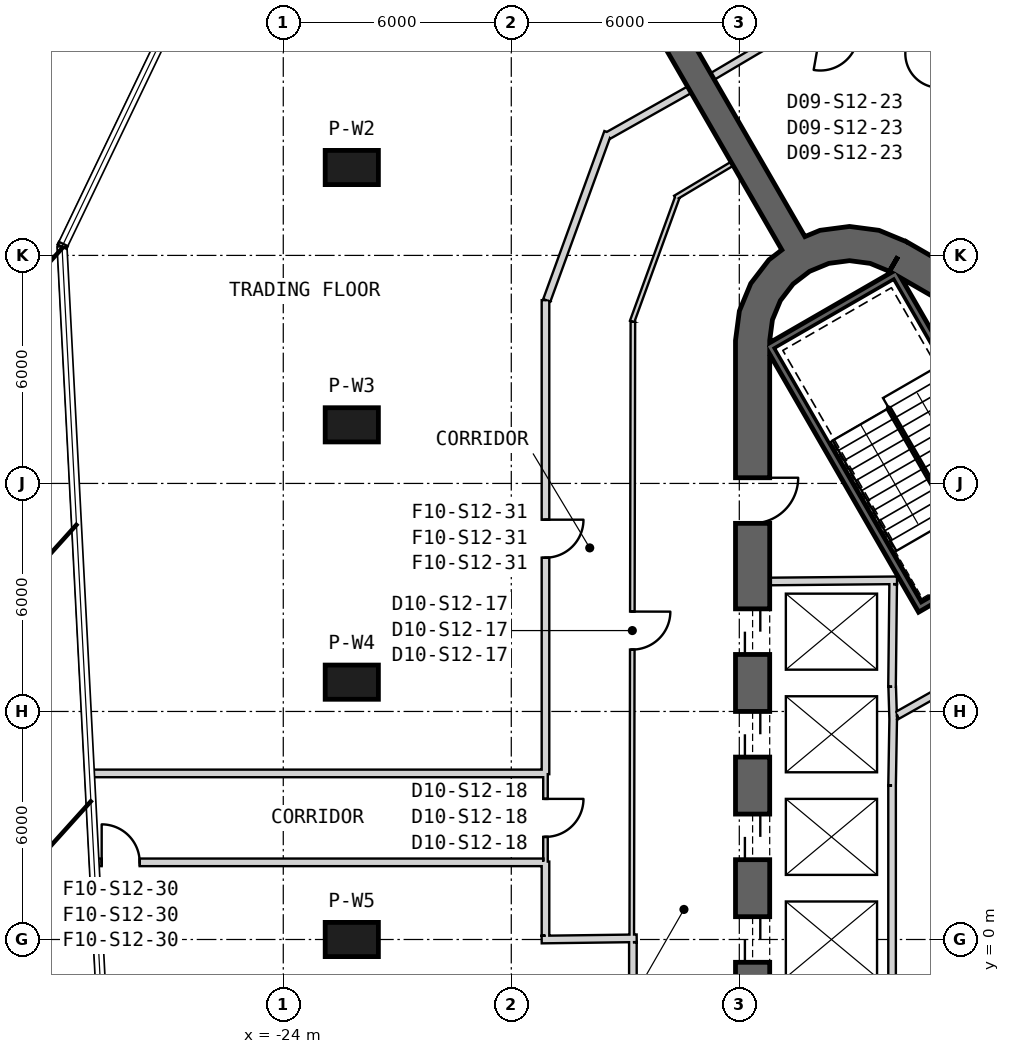
"""IFC4 building model, lengths in metres.
Left out: names, types, materials, properties, quantities, classifications, styles, units other than length and angle.
Written with IfcOpenShell. Run it as: python <this file> out.ifc"""

import sys

from ifc_helpers import new_model, si_unit, direction, frame, frame_2d, origin, origin_2d, place, context, subcontext, project, spatial, polyline, rectangle, outline, extrude, element, fill, save


model = new_model("IFC4")
c1 = context("Model", 3, precision=1e-05, world=origin(), true_north=direction((0.0, 1.0)))
c2 = subcontext(c1, "Body", "Model", "MODEL_VIEW")
j1 = project(units=[si_unit("LENGTHUNIT", "METRE"), si_unit("PLANEANGLEUNIT", "RADIAN")], contexts=[c1])
p1 = place(None, origin())
s1 = spatial("IfcSite", under=j1, at=p1, CompositionType="ELEMENT")
p2 = place(p1, origin())
s2 = spatial("IfcBuilding", under=s1, at=p2, CompositionType="ELEMENT")
p3 = place(p2, frame((0.0, 0.0, 205.2)))
s3 = spatial("IfcBuildingStorey", under=s2, at=p3, CompositionType="ELEMENT", Elevation=205.2)
for number, where, z_axis, x_axis in (
    (1, (-22.197, 20.313, 0.0), (0.0, 0.0, 1.0), (-1.0, 0.0, 0.0)),
    (2, (-22.197, 13.542, 0.0), (0.0, 0.0, 1.0), (-1.0, 0.0, 0.0)),
    (3, (-22.197, 6.771, 0.0), (0.0, 0.0, 1.0), (-1.0, 0.0, 0.0)),
    (4, (-22.197, 0.0, 0.0), (0.0, 0.0, 1.0), (-1.0, 0.0, 0.0)),
):
    element("IfcColumn", number, at=place(p3, frame(where, z_axis=z_axis, x_axis=x_axis)), inside=s3, PredefinedType="COLUMN", context=c2, shape_type="SweptSolid", body=[
        extrude(rectangle(XDim=1.4, YDim=0.9, at=origin_2d()), origin(), (0.0, 0.0, 1.0), 4.0),
    ])
p4 = place(p3, frame((19.475, 2.208, 0.0), z_axis=(0.0, 0.0, 1.0), x_axis=(-0.866028369851, 0.499994862586, 0.0)))
e5 = element("IfcWall", 5, at=p4, inside=s3, PredefinedType="SHEAR", context=c2, shape_type="SweptSolid", body=[
    extrude(rectangle(XDim=31.523, YDim=0.9, at=frame_2d((15.762, 0.0))), origin(), (0.0, 0.0, 1.0), 4.0),
])
p5 = place(p4, frame((7.062, 0.0, 0.0)))
e6 = element("IfcOpeningElement", 6, at=p5, cuts=e5, PredefinedType="OPENING", context=c2, shape_type="SweptSolid", body=[
    extrude(rectangle(XDim=1.2, YDim=2.4, at=frame_2d((0.6, 1.2))), frame((0.0, 0.46, 0.0), z_axis=(0.0, -1.0, 0.0), x_axis=(1.0, 0.0, 0.0)), (0.0, 0.0, 1.0), 0.92),
])
p6 = place(p4, frame((3.612, 0.0, 0.0)))
e7 = element("IfcOpeningElement", 7, at=p6, cuts=e5, PredefinedType="OPENING", context=c2, shape_type="SweptSolid", body=[
    extrude(rectangle(XDim=1.2, YDim=2.4, at=frame_2d((0.6, 1.2))), frame((0.0, 0.46, 0.0), z_axis=(0.0, -1.0, 0.0), x_axis=(1.0, 0.0, 0.0)), (0.0, 0.0, 1.0), 0.92),
])
p7 = place(p4, frame((26.712, 0.0, 0.0)))
e8 = element("IfcOpeningElement", 8, at=p7, cuts=e5, PredefinedType="OPENING", context=c2, shape_type="SweptSolid", body=[
    extrude(rectangle(XDim=1.2, YDim=2.4, at=frame_2d((0.6, 1.2))), frame((0.0, 0.46, 0.0), z_axis=(0.0, -1.0, 0.0), x_axis=(1.0, 0.0, 0.0)), (0.0, 0.0, 1.0), 0.92),
])
p8 = place(p3, frame((-11.65, 15.762, 0.0), z_axis=(0.0, 0.0, 1.0), x_axis=(0.0, -1.0, 0.0)))
e9 = element("IfcWall", 9, at=p8, inside=s3, PredefinedType="SHEAR", context=c2, shape_type="SweptSolid", body=[
    extrude(rectangle(XDim=31.523, YDim=0.9, at=frame_2d((15.762, 0.0))), origin(), (0.0, 0.0, 1.0), 4.0),
])
p9 = place(p8, frame((7.062, 0.0, 0.0)))
e10 = element("IfcOpeningElement", 10, at=p9, cuts=e9, PredefinedType="OPENING", context=c2, shape_type="SweptSolid", body=[
    extrude(rectangle(XDim=1.2, YDim=2.4, at=frame_2d((0.6, 1.2))), frame((0.0, 0.46, 0.0), z_axis=(0.0, -1.0, 0.0), x_axis=(1.0, 0.0, 0.0)), (0.0, 0.0, 1.0), 0.92),
])
p10 = place(p8, frame((9.762, 0.0, 0.0)))
e11 = element("IfcOpeningElement", 11, at=p10, cuts=e9, PredefinedType="OPENING", context=c2, shape_type="SweptSolid", body=[
    extrude(rectangle(XDim=1.2, YDim=2.4, at=frame_2d((0.6, 1.2))), frame((0.0, 0.46, 0.0), z_axis=(0.0, -1.0, 0.0), x_axis=(1.0, 0.0, 0.0)), (0.0, 0.0, 1.0), 0.92),
])
p11 = place(p8, frame((12.462, 0.0, 0.0)))
e12 = element("IfcOpeningElement", 12, at=p11, cuts=e9, PredefinedType="OPENING", context=c2, shape_type="SweptSolid", body=[
    extrude(rectangle(XDim=1.2, YDim=2.4, at=frame_2d((0.6, 1.2))), frame((0.0, 0.46, 0.0), z_axis=(0.0, -1.0, 0.0), x_axis=(1.0, 0.0, 0.0)), (0.0, 0.0, 1.0), 0.92),
])
p12 = place(p8, frame((15.162, 0.0, 0.0)))
e13 = element("IfcOpeningElement", 13, at=p12, cuts=e9, PredefinedType="OPENING", context=c2, shape_type="SweptSolid", body=[
    extrude(rectangle(XDim=1.2, YDim=2.4, at=frame_2d((0.6, 1.2))), frame((0.0, 0.46, 0.0), z_axis=(0.0, -1.0, 0.0), x_axis=(1.0, 0.0, 0.0)), (0.0, 0.0, 1.0), 0.92),
])
p13 = place(p8, frame((17.862, 0.0, 0.0)))
e14 = element("IfcOpeningElement", 14, at=p13, cuts=e9, PredefinedType="OPENING", context=c2, shape_type="SweptSolid", body=[
    extrude(rectangle(XDim=1.2, YDim=2.4, at=frame_2d((0.6, 1.2))), frame((0.0, 0.46, 0.0), z_axis=(0.0, -1.0, 0.0), x_axis=(1.0, 0.0, 0.0)), (0.0, 0.0, 1.0), 0.92),
])
p14 = place(p8, frame((20.562, 0.0, 0.0)))
e15 = element("IfcOpeningElement", 15, at=p14, cuts=e9, PredefinedType="OPENING", context=c2, shape_type="SweptSolid", body=[
    extrude(rectangle(XDim=1.2, YDim=2.4, at=frame_2d((0.6, 1.2))), frame((0.0, 0.46, 0.0), z_axis=(0.0, -1.0, 0.0), x_axis=(1.0, 0.0, 0.0)), (0.0, 0.0, 1.0), 0.92),
])
p15 = place(p8, frame((23.262, 0.0, 0.0)))
e16 = element("IfcOpeningElement", 16, at=p15, cuts=e9, PredefinedType="OPENING", context=c2, shape_type="SweptSolid", body=[
    extrude(rectangle(XDim=1.2, YDim=2.4, at=frame_2d((0.6, 1.2))), frame((0.0, 0.46, 0.0), z_axis=(0.0, -1.0, 0.0), x_axis=(1.0, 0.0, 0.0)), (0.0, 0.0, 1.0), 0.92),
])
p16 = place(p8, frame((3.612, 0.0, 0.0)))
e17 = element("IfcOpeningElement", 17, at=p16, cuts=e9, PredefinedType="OPENING", context=c2, shape_type="SweptSolid", body=[
    extrude(rectangle(XDim=1.2, YDim=2.4, at=frame_2d((0.6, 1.2))), frame((0.0, 0.46, 0.0), z_axis=(0.0, -1.0, 0.0), x_axis=(1.0, 0.0, 0.0)), (0.0, 0.0, 1.0), 0.92),
])
p17 = place(p8, frame((26.712, 0.0, 0.0)))
e18 = element("IfcOpeningElement", 18, at=p17, cuts=e9, PredefinedType="OPENING", context=c2, shape_type="SweptSolid", body=[
    extrude(rectangle(XDim=1.2, YDim=2.4, at=frame_2d((0.6, 1.2))), frame((0.0, 0.46, 0.0), z_axis=(0.0, -1.0, 0.0), x_axis=(1.0, 0.0, 0.0)), (0.0, 0.0, 1.0), 0.92),
])
p18 = place(p3, origin())
e19 = element("IfcWall", 19, at=p18, inside=s3, PredefinedType="SHEAR", context=c2, shape_type="SweptSolid", body=[
    extrude(outline(polyline([(-7.6, 18.36), (-8.323, 18.659), (-9.1, 18.762), (-9.876, 18.659), (-10.6, 18.36), (-11.221, 17.883), (-11.698, 17.262), (-11.998, 16.538), (-12.1, 15.762), (-11.2, 15.762), (-11.128, 16.305), (-10.919, 16.812), (-10.585, 17.247), (-10.15, 17.58), (-9.644, 17.79), (-9.1, 17.862), (-8.556, 17.79), (-8.05, 17.58), (-7.6, 18.36)])), origin(), (0.0, 0.0, 1.0), 4.0),
])
p19 = place(p3, frame((-10.575, 18.316, 0.0), z_axis=(0.0, 0.0, 1.0), x_axis=(-0.499999598486, 0.866025635599, 0.0)))
e20 = element("IfcWall", 20, at=p19, inside=s3, PredefinedType="SHEAR", context=c2, shape_type="SweptSolid", body=[
    extrude(rectangle(XDim=11.794, YDim=0.7, at=frame_2d((5.897, 0.0))), origin(), (0.0, 0.0, 1.0), 4.0),
])
p20 = place(p3, frame((-11.2, 9.42, 0.0), z_axis=(0.0, 0.0, 1.0), x_axis=(0.999957167047, 0.009255488683, 0.0)))
e21 = element("IfcWall", 21, at=p20, inside=s3, PredefinedType="PLUMBINGWALL", context=c2, shape_type="SweptSolid", body=[
    extrude(rectangle(XDim=3.35, YDim=0.2, at=frame_2d((1.675, 0.0))), origin(), (0.0, 0.0, 1.0), 3.7),
])
p21 = place(p3, frame((-7.951, 9.35, 0.0), z_axis=(0.0, 0.0, 1.0), x_axis=(-0.011120469654, -0.999938165666, 0.0)))
e22 = element("IfcWall", 22, at=p21, inside=s3, PredefinedType="PLUMBINGWALL", context=c2, shape_type="SweptSolid", body=[
    extrude(rectangle(XDim=2.7, YDim=0.2, at=frame_2d((1.35, 0.0))), origin(), (0.0, 0.0, 1.0), 3.7),
])
p22 = place(p3, frame((-7.977, 6.65, 0.0), z_axis=(0.0, 0.0, 1.0), x_axis=(0.030861509705, -0.999523670164, 0.0)))
e23 = element("IfcWall", 23, at=p22, inside=s3, PredefinedType="PLUMBINGWALL", context=c2, shape_type="SweptSolid", body=[
    extrude(rectangle(XDim=0.878, YDim=0.2, at=frame_2d((0.439, 0.0))), origin(), (0.0, 0.0, 1.0), 3.7),
])
p23 = place(p3, frame((-7.949, 5.894, 0.0), z_axis=(0.0, 0.0, 1.0), x_axis=(-0.016809909365, -0.999858703491, 0.0)))
e24 = element("IfcWall", 24, at=p23, inside=s3, PredefinedType="PLUMBINGWALL", context=c2, shape_type="SweptSolid", body=[
    extrude(rectangle(XDim=1.844, YDim=0.2, at=frame_2d((0.922, 0.0))), origin(), (0.0, 0.0, 1.0), 3.7),
])
p24 = place(p3, frame((-7.98, 4.05, 0.0), z_axis=(0.0, 0.0, 1.0), x_axis=(0.0, -1.0, 0.0)))
e25 = element("IfcWall", 25, at=p24, inside=s3, PredefinedType="PLUMBINGWALL", context=c2, shape_type="SweptSolid", body=[
    extrude(rectangle(XDim=8.1, YDim=0.2, at=frame_2d((4.05, 0.0))), origin(), (0.0, 0.0, 1.0), 3.7),
])
p25 = place(p3, frame((-11.245, 15.678, -0.3), z_axis=(0.0, 0.0, 1.0), x_axis=(0.499977274689, -0.866038523851, 0.0)))
e26 = element("IfcWall", 26, at=p25, inside=s3, PredefinedType="SHEAR", context=c2, shape_type="SweptSolid", body=[
    extrude(rectangle(XDim=8.1, YDim=0.2, at=frame_2d((4.05, 0.0))), origin(), (0.0, 0.0, 1.0), 4.0),
])
p26 = place(p3, frame((-7.818, 17.541, -0.3), z_axis=(0.0, 0.0, 1.0), x_axis=(-0.866044365799, -0.499967155389, 0.0)))
e27 = element("IfcWall", 27, at=p26, inside=s3, PredefinedType="SHEAR", context=c2, shape_type="SweptSolid", body=[
    extrude(rectangle(XDim=3.8, YDim=0.2, at=frame_2d((1.9, 0.0))), origin(), (0.0, 0.0, 1.0), 4.0),
])
p27 = place(p3, frame((-7.854, 17.405, -0.3), z_axis=(0.0, 0.0, 1.0), x_axis=(0.499997992926, -0.866026562566, 0.0)))
e28 = element("IfcWall", 28, at=p27, inside=s3, PredefinedType="SHEAR", context=c2, shape_type="SweptSolid", body=[
    extrude(rectangle(XDim=7.9, YDim=0.2, at=frame_2d((3.95, 0.0))), origin(), (0.0, 0.0, 1.0), 4.0),
])
p28 = place(p3, frame((-7.159, 8.8, -0.3), z_axis=(0.0, 0.0, 1.0), x_axis=(0.866047807691, 0.499961193289, 0.0)))
e29 = element("IfcWall", 29, at=p28, inside=s3, PredefinedType="SHEAR", context=c2, shape_type="SweptSolid", body=[
    extrude(rectangle(XDim=3.6, YDim=0.2, at=frame_2d((1.8, 0.0))), origin(), (0.0, 0.0, 1.0), 4.0),
])
p29 = place(p28, frame((1.25, 0.0, 0.3)))
e30 = element("IfcOpeningElement", 30, at=p29, cuts=e29, PredefinedType="OPENING", context=c2, shape_type="SweptSolid", body=[
    extrude(rectangle(XDim=1.1, YDim=2.1, at=frame_2d((0.55, 1.05))), frame((0.0, 0.11, 0.0), z_axis=(0.0, -1.0, 0.0), x_axis=(1.0, 0.0, 0.0)), (0.0, 0.0, 1.0), 0.22),
])
p30 = place(p3, frame((-5.6, 7.16, 0.0), z_axis=(0.0, 0.0, 1.0), x_axis=(-0.871340486379, -0.490678873396, 0.0)))
e31 = element("IfcWall", 31, at=p30, inside=s3, PredefinedType="PARTITIONING", context=c2, shape_type="SweptSolid", body=[
    extrude(rectangle(XDim=2.581, YDim=0.2, at=frame_2d((1.291, 0.0))), origin(), (0.0, 0.0, 1.0), 3.7),
])
p31 = place(p3, frame((-12.189, 20.411, 0.0), z_axis=(0.0, 0.0, 1.0), x_axis=(-0.858492721014, -0.51282574815, 0.0)))
e32 = element("IfcWall", 32, at=p31, inside=s3, PredefinedType="PARTITIONING", context=c2, shape_type="SweptSolid", body=[
    extrude(rectangle(XDim=1.742, YDim=0.12, at=frame_2d((0.871, 0.0))), origin(), (0.0, 0.0, 1.0), 3.7),
])
p32 = place(p3, frame((-13.631, 19.53, 0.0), z_axis=(0.0, 0.0, 1.0), x_axis=(-0.342069878069, -0.939674517329, 0.0)))
e33 = element("IfcWall", 33, at=p32, inside=s3, PredefinedType="PARTITIONING", context=c2, shape_type="SweptSolid", body=[
    extrude(rectangle(XDim=3.479, YDim=0.12, at=frame_2d((1.739, 0.0))), origin(), (0.0, 0.0, 1.0), 2.78),
])
p33 = place(p3, frame((-14.8, 16.257, 0.0), z_axis=(0.0, 0.0, 1.0), x_axis=(-0.001847148781, -0.999998294019, 0.0)))
e34 = element("IfcWall", 34, at=p33, inside=s3, PredefinedType="PARTITIONING", context=c2, shape_type="SweptSolid", body=[
    extrude(rectangle(XDim=16.257, YDim=0.12, at=frame_2d((8.128, 0.0))), origin(), (0.0, 0.0, 1.0), 2.88),
])
p34 = place(p33, frame((7.629, 0.0, 0.0)))
e35 = element("IfcOpeningElement", 35, at=p34, cuts=e34, PredefinedType="OPENING", context=c2, shape_type="SweptSolid", body=[
    extrude(rectangle(XDim=1.0, YDim=2.1, at=frame_2d((0.5, 1.05))), frame((0.0, 0.07, 0.0), z_axis=(0.0, -1.0, 0.0), x_axis=(1.0, 0.0, 0.0)), (0.0, 0.0, 1.0), 0.14),
])
p35 = place(p3, frame((-17.1, 4.35, 0.0), z_axis=(0.0, 0.0, 1.0), x_axis=(0.0, -1.0, 0.0)))
e36 = element("IfcWall", 36, at=p35, inside=s3, PredefinedType="PARTITIONING", context=c2, shape_type="SweptSolid", body=[
    extrude(rectangle(XDim=2.3, YDim=0.12, at=frame_2d((1.15, 0.0))), origin(), (0.0, 0.0, 1.0), 3.7),
])
p36 = place(p35, frame((0.65, 0.0, 0.0)))
e37 = element("IfcOpeningElement", 37, at=p36, cuts=e36, PredefinedType="OPENING", context=c2, shape_type="SweptSolid", body=[
    extrude(rectangle(XDim=1.0, YDim=2.1, at=frame_2d((0.5, 1.05))), frame((0.0, 0.07, 0.0), z_axis=(0.0, -1.0, 0.0), x_axis=(1.0, 0.0, 0.0)), (0.0, 0.0, 1.0), 0.14),
])
p37 = place(p3, frame((-17.2, -0.001, 0.0), z_axis=(0.0, 0.0, 1.0), x_axis=(0.999915662945, 0.012987185857, 0.0)))
e38 = element("IfcWall", 38, at=p37, inside=s3, PredefinedType="PARTITIONING", context=c2, shape_type="SweptSolid", body=[
    extrude(rectangle(XDim=2.5, YDim=0.2, at=frame_2d((1.25, 0.0))), origin(), (0.0, 0.0, 1.0), 3.07),
])
p38 = place(p3, frame((-17.1, 16.823, 0.0), z_axis=(0.0, 0.0, 1.0), x_axis=(0.0, -1.0, 0.0)))
e39 = element("IfcWall", 39, at=p38, inside=s3, PredefinedType="PARTITIONING", context=c2, shape_type="SweptSolid", body=[
    extrude(rectangle(XDim=12.473, YDim=0.2, at=frame_2d((6.236, 0.0))), origin(), (0.0, 0.0, 1.0), 2.88),
])
p39 = place(p38, frame((5.776, 0.0, 0.0)))
e40 = element("IfcOpeningElement", 40, at=p39, cuts=e39, PredefinedType="OPENING", context=c2, shape_type="SweptSolid", body=[
    extrude(rectangle(XDim=1.0, YDim=2.1, at=frame_2d((0.5, 1.05))), frame((0.0, 0.11, 0.0), z_axis=(0.0, -1.0, 0.0), x_axis=(1.0, 0.0, 0.0)), (0.0, 0.0, 1.0), 0.22),
])
p40 = place(p3, frame((-17.1, 2.05, 0.0), z_axis=(0.0, 0.0, 1.0), x_axis=(0.0, -1.0, 0.0)))
e41 = element("IfcWall", 41, at=p40, inside=s3, PredefinedType="PARTITIONING", context=c2, shape_type="SweptSolid", body=[
    extrude(rectangle(XDim=1.95, YDim=0.2, at=frame_2d((0.975, 0.0))), origin(), (0.0, 0.0, 1.0), 3.07),
])
p41 = place(p3, frame((-15.456, 21.239, 0.0), z_axis=(0.0, 0.0, 1.0), x_axis=(-0.34205546997, -0.939679762187, 0.0)))
e42 = element("IfcWall", 42, at=p41, inside=s3, PredefinedType="PARTITIONING", context=c2, shape_type="SweptSolid", body=[
    extrude(rectangle(XDim=4.706, YDim=0.2, at=frame_2d((2.353, 0.0))), origin(), (0.0, 0.0, 1.0), 2.78),
])
p42 = place(p3, frame((-13.313, 22.359, 0.0), z_axis=(0.0, 0.0, 1.0), x_axis=(-0.87121710687, -0.490897904555, 0.0)))
e43 = element("IfcWall", 43, at=p42, inside=s3, PredefinedType="PARTITIONING", context=c2, shape_type="SweptSolid", body=[
    extrude(rectangle(XDim=2.457, YDim=0.2, at=frame_2d((1.229, 0.0))), origin(), (0.0, 0.0, 1.0), 3.7),
])
p43 = place(p3, frame((-14.8, -0.07, 0.0), z_axis=(0.0, 0.0, 1.0), x_axis=(0.0, -1.0, 0.0)))
e44 = element("IfcWall", 44, at=p43, inside=s3, PredefinedType="PARTITIONING", context=c2, shape_type="SweptSolid", body=[
    extrude(rectangle(XDim=16.147, YDim=0.2, at=frame_2d((8.073, 0.0))), origin(), (0.0, 0.0, 1.0), 2.88),
])
p44 = place(p3, frame((-10.55, 23.985, 0.0), z_axis=(0.0, 0.0, 1.0), x_axis=(-0.860742216303, -0.509041095663, 0.0)))
e45 = element("IfcWall", 45, at=p44, inside=s3, PredefinedType="PARTITIONING", context=c2, shape_type="SweptSolid", body=[
    extrude(rectangle(XDim=2.506, YDim=0.2, at=frame_2d((1.253, 0.0))), origin(), (0.0, 0.0, 1.0), 3.7),
])
p45 = place(p3, frame((-5.873, 23.16, 0.0), z_axis=(0.0, 0.0, 1.0), x_axis=(-0.984810190637, 0.173634352644, 0.0)))
e46 = element("IfcWall", 46, at=p45, inside=s3, PredefinedType="PARTITIONING", context=c2, shape_type="SweptSolid", body=[
    extrude(rectangle(XDim=2.583, YDim=0.12, at=frame_2d((1.292, 0.0))), origin(), (0.0, 0.0, 1.0), 3.7),
])
p46 = place(p45, frame((0.872, 0.0, 0.0)))
e47 = element("IfcOpeningElement", 47, at=p46, cuts=e46, PredefinedType="OPENING", context=c2, shape_type="SweptSolid", body=[
    extrude(rectangle(XDim=0.9, YDim=2.1, at=frame_2d((0.45, 1.05))), frame((0.0, 0.07, 0.0), z_axis=(0.0, -1.0, 0.0), x_axis=(1.0, 0.0, 0.0)), (0.0, 0.0, 1.0), 0.14),
])
p47 = place(p3, frame((-28.979, 2.03, 0.0), z_axis=(0.0, 0.0, 1.0), x_axis=(1.0, 0.0, 0.0)))
e48 = element("IfcWall", 48, at=p47, inside=s3, PredefinedType="PARTITIONING", context=c2, shape_type="SweptSolid", body=[
    extrude(rectangle(XDim=11.819, YDim=0.2, at=frame_2d((5.909, 0.0))), origin(), (0.0, 0.0, 1.0), 3.7),
])
p48 = place(p47, frame((0.2, 0.0, 0.0)))
e49 = element("IfcOpeningElement", 49, at=p48, cuts=e48, PredefinedType="OPENING", context=c2, shape_type="SweptSolid", body=[
    extrude(rectangle(XDim=1.0, YDim=2.1, at=frame_2d((0.5, 1.05))), frame((0.0, 0.11, 0.0), z_axis=(0.0, -1.0, 0.0), x_axis=(1.0, 0.0, 0.0)), (0.0, 0.0, 1.0), 0.22),
])
p49 = place(p3, frame((-17.16, 4.37, 0.0), z_axis=(0.0, 0.0, 1.0), x_axis=(-1.0, 0.0, 0.0)))
e50 = element("IfcWall", 50, at=p49, inside=s3, PredefinedType="PARTITIONING", context=c2, shape_type="SweptSolid", body=[
    extrude(rectangle(XDim=11.94, YDim=0.2, at=frame_2d((5.97, 0.0))), origin(), (0.0, 0.0, 1.0), 3.7),
])
p50 = place(p34, origin())
e51 = element("IfcDoor", 51, at=p50, inside=s3, OperationType="SINGLE_SWING_LEFT", PredefinedType="NOTDEFINED", context=c2, shape_type="SweptSolid", body=[
    extrude(rectangle(XDim=1.0, YDim=2.1, at=frame_2d((0.5, 1.05))), frame((0.0, 0.025, 0.0), z_axis=(0.0, -1.0, 0.0), x_axis=(1.0, 0.0, 0.0)), (0.0, 0.0, 1.0), 0.05),
])
fill(e35, e51)
p51 = place(p36, origin())
e52 = element("IfcDoor", 52, at=p51, inside=s3, OperationType="SINGLE_SWING_LEFT", PredefinedType="NOTDEFINED", context=c2, shape_type="SweptSolid", body=[
    extrude(rectangle(XDim=1.0, YDim=2.1, at=frame_2d((0.5, 1.05))), frame((0.0, 0.025, 0.0), z_axis=(0.0, -1.0, 0.0), x_axis=(1.0, 0.0, 0.0)), (0.0, 0.0, 1.0), 0.05),
])
fill(e37, e52)
p52 = place(p46, origin())
e53 = element("IfcDoor", 53, at=p52, inside=s3, OperationType="SINGLE_SWING_RIGHT", PredefinedType="NOTDEFINED", context=c2, shape_type="SweptSolid", body=[
    extrude(rectangle(XDim=0.9, YDim=2.1, at=frame_2d((0.45, 1.05))), frame((0.0, 0.025, 0.0), z_axis=(0.0, -1.0, 0.0), x_axis=(1.0, 0.0, 0.0)), (0.0, 0.0, 1.0), 0.05),
])
fill(e47, e53)
p53 = place(p48, origin())
e54 = element("IfcDoor", 54, at=p53, inside=s3, OperationType="SINGLE_SWING_RIGHT", PredefinedType="USERDEFINED", context=c2, shape_type="SweptSolid", body=[
    extrude(rectangle(XDim=1.0, YDim=2.1, at=frame_2d((0.5, 1.05))), frame((0.0, 0.025, 0.0), z_axis=(0.0, -1.0, 0.0), x_axis=(1.0, 0.0, 0.0)), (0.0, 0.0, 1.0), 0.05),
])
fill(e49, e54)
p54 = place(p39, origin())
e55 = element("IfcDoor", 55, at=p54, inside=s3, OperationType="SINGLE_SWING_RIGHT", PredefinedType="USERDEFINED", context=c2, shape_type="SweptSolid", body=[
    extrude(rectangle(XDim=1.0, YDim=2.1, at=frame_2d((0.5, 1.05))), frame((0.0, 0.025, 0.0), z_axis=(0.0, -1.0, 0.0), x_axis=(1.0, 0.0, 0.0)), (0.0, 0.0, 1.0), 0.05),
])
fill(e40, e55)
p55 = place(p9, origin())
e56 = element("IfcDoor", 56, at=p55, inside=s3, OperationType="SLIDING_TO_LEFT", PredefinedType="USERDEFINED", context=c2, shape_type="SweptSolid", body=[
    extrude(rectangle(XDim=1.2, YDim=2.4, at=frame_2d((0.6, 1.2))), frame((0.0, 0.025, 0.0), z_axis=(0.0, -1.0, 0.0), x_axis=(1.0, 0.0, 0.0)), (0.0, 0.0, 1.0), 0.05),
])
fill(e10, e56)
p56 = place(p10, origin())
e57 = element("IfcDoor", 57, at=p56, inside=s3, OperationType="SLIDING_TO_LEFT", PredefinedType="USERDEFINED", context=c2, shape_type="SweptSolid", body=[
    extrude(rectangle(XDim=1.2, YDim=2.4, at=frame_2d((0.6, 1.2))), frame((0.0, 0.025, 0.0), z_axis=(0.0, -1.0, 0.0), x_axis=(1.0, 0.0, 0.0)), (0.0, 0.0, 1.0), 0.05),
])
fill(e11, e57)
p57 = place(p11, origin())
e58 = element("IfcDoor", 58, at=p57, inside=s3, OperationType="SLIDING_TO_LEFT", PredefinedType="USERDEFINED", context=c2, shape_type="SweptSolid", body=[
    extrude(rectangle(XDim=1.2, YDim=2.4, at=frame_2d((0.6, 1.2))), frame((0.0, 0.025, 0.0), z_axis=(0.0, -1.0, 0.0), x_axis=(1.0, 0.0, 0.0)), (0.0, 0.0, 1.0), 0.05),
])
fill(e12, e58)
p58 = place(p12, origin())
e59 = element("IfcDoor", 59, at=p58, inside=s3, OperationType="SLIDING_TO_LEFT", PredefinedType="USERDEFINED", context=c2, shape_type="SweptSolid", body=[
    extrude(rectangle(XDim=1.2, YDim=2.4, at=frame_2d((0.6, 1.2))), frame((0.0, 0.025, 0.0), z_axis=(0.0, -1.0, 0.0), x_axis=(1.0, 0.0, 0.0)), (0.0, 0.0, 1.0), 0.05),
])
fill(e13, e59)
p59 = place(p16, origin())
e60 = element("IfcDoor", 60, at=p59, inside=s3, OperationType="SINGLE_SWING_LEFT", PredefinedType="USERDEFINED", context=c2, shape_type="SweptSolid", body=[
    extrude(rectangle(XDim=1.2, YDim=2.4, at=frame_2d((0.6, 1.2))), frame((0.0, 0.025, 0.0), z_axis=(0.0, -1.0, 0.0), x_axis=(1.0, 0.0, 0.0)), (0.0, 0.0, 1.0), 0.05),
])
fill(e17, e60)
save(model, sys.argv[1])
